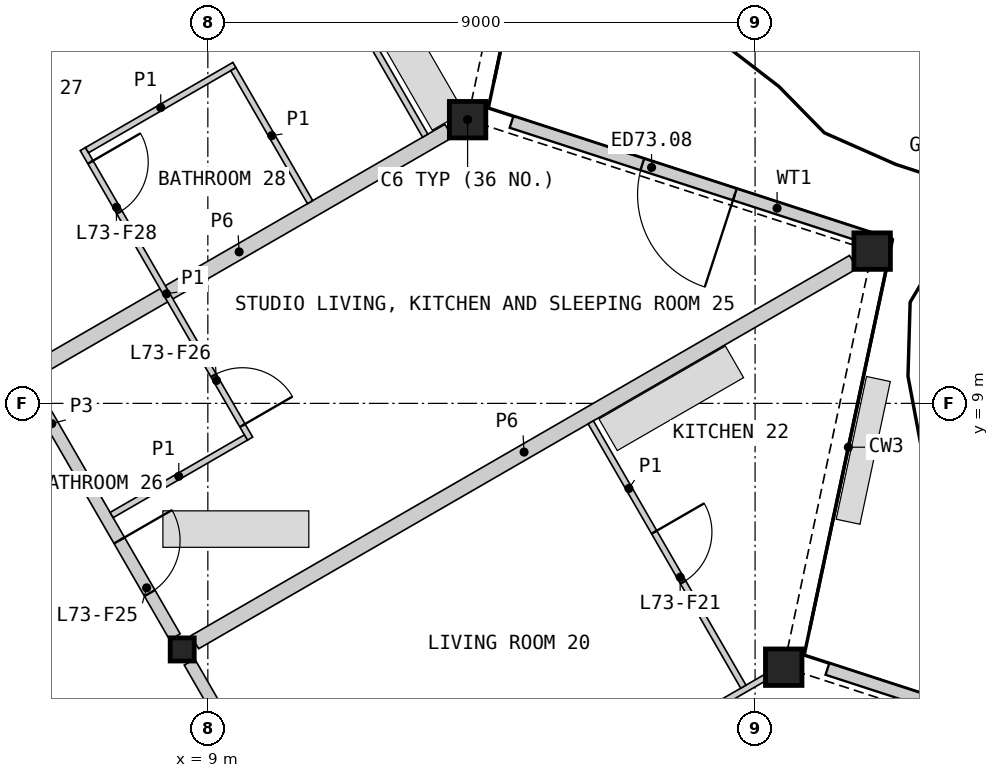
"""IFC4 building model, lengths in metres.
Left out: names, types, materials, properties, quantities, classifications, styles, units other than length and angle.
Written with IfcOpenShell. Run it as: python <this file> out.ifc"""

import sys

from ifc_helpers import new_model, si_unit, direction, frame, frame_2d, origin, origin_2d, place, context, subcontext, project, spatial, polyline, rectangle, hollow_rectangle, i_section, outline, extrude, element, fill, save


model = new_model("IFC4")
c1 = context("Model", 3, precision=1e-05, world=origin(), true_north=direction((0.0, 1.0)))
c2 = subcontext(c1, "Body", "Model", "MODEL_VIEW")
j1 = project(units=[si_unit("LENGTHUNIT", "METRE"), si_unit("PLANEANGLEUNIT", "RADIAN")], contexts=[c1])
p1 = place(None, origin())
s1 = spatial("IfcSite", under=j1, at=p1, CompositionType="ELEMENT")
p2 = place(p1, origin())
s2 = spatial("IfcBuilding", under=s1, at=p2, CompositionType="ELEMENT")
p3 = place(p2, frame((0.0, 0.0, 329.0)))
s3 = spatial("IfcBuildingStorey", under=s2, at=p3, CompositionType="ELEMENT", Elevation=329.0)
for number, where, z_axis, x_axis in (
    (1, (18.471, 4.661, 0.0), (0.0, 0.0, 1.0), (1.0, 0.0, 0.0)),
    (2, (19.926, 11.504, 0.0), (0.0, 0.0, 1.0), (1.0, 0.0, 0.0)),
    (3, (13.272, 13.666, 0.0), (0.0, 0.0, 1.0), (1.0, 0.0, 0.0)),
):
    element("IfcColumn", number, at=place(p3, frame(where, z_axis=z_axis, x_axis=x_axis)), inside=s3, PredefinedType="COLUMN", context=c2, shape_type="SweptSolid", body=[
        extrude(hollow_rectangle(XDim=0.6, YDim=0.6, WallThickness=0.04, at=origin_2d()), origin(), (0.0, 0.0, 1.0), 3.4),
    ])
p4 = place(p3, frame((8.578, 4.953, 0.0), z_axis=(0.0, 0.0, 1.0), x_axis=(1.0, 0.0, 0.0)))
e4 = element("IfcColumn", 4, at=p4, inside=s3, PredefinedType="COLUMN", context=c2, shape_type="SweptSolid", body=[
    extrude(i_section(OverallWidth=0.396, OverallDepth=0.381, WebThickness=0.019, FlangeThickness=0.03, at=origin_2d()), origin(), (0.0, 0.0, 1.0), 3.4),
])
p5 = place(p3, frame((25.012, 2.739, 0.0), z_axis=(0.0, 0.0, 1.0), x_axis=(-0.951056631566, 0.309016639608, 0.0)))
e5 = element("IfcWall", 5, at=p5, inside=s3, PredefinedType="SOLIDWALL", context=c2, shape_type="SweptSolid", body=[
    extrude(rectangle(XDim=6.122, YDim=0.2, at=frame_2d((3.061, 0.0))), origin(), (0.0, 0.0, 1.0), 2.488),
])
p6 = place(p5, frame((2.261, 0.0, 0.0)))
e6 = element("IfcOpeningElement", 6, at=p6, cuts=e5, PredefinedType="OPENING", context=c2, shape_type="SweptSolid", body=[
    extrude(rectangle(XDim=1.6, YDim=2.25, at=frame_2d((0.8, 1.125))), frame((0.0, 0.11, 0.0), z_axis=(0.0, -1.0, 0.0), x_axis=(1.0, 0.0, 0.0)), (0.0, 0.0, 1.0), 0.22),
])
p7 = place(p3, frame((19.817, 11.737, 0.0), z_axis=(0.0, 0.0, 1.0), x_axis=(-0.951056631566, 0.309016639608, 0.0)))
e7 = element("IfcWall", 7, at=p7, inside=s3, PredefinedType="SOLIDWALL", context=c2, shape_type="SweptSolid", body=[
    extrude(rectangle(XDim=6.122, YDim=0.2, at=frame_2d((3.061, 0.0))), origin(), (0.0, 0.0, 1.0), 2.488),
])
p8 = place(p7, frame((2.261, 0.0, 0.0)))
e8 = element("IfcOpeningElement", 8, at=p8, cuts=e7, PredefinedType="OPENING", context=c2, shape_type="SweptSolid", body=[
    extrude(rectangle(XDim=1.6, YDim=2.25, at=frame_2d((0.8, 1.125))), frame((0.0, 0.11, 0.0), z_axis=(0.0, -1.0, 0.0), x_axis=(1.0, 0.0, 0.0)), (0.0, 0.0, 1.0), 0.22),
])
p9 = place(p3, origin())
e9 = element("IfcWall", 9, at=p9, inside=s3, PredefinedType="SHEAR", context=c2, shape_type="SweptSolid", body=[
    extrude(outline(polyline([(1.561, 6.097), (3.731, 7.35), (8.231, -0.444), (6.061, -1.697), (5.96, -1.524), (7.952, -0.374), (6.952, 1.358), (4.96, 0.208), (4.861, 0.381), (6.852, 1.531), (5.852, 3.263), (3.861, 2.113), (3.76, 2.287), (5.752, 3.437), (4.752, 5.169), (2.76, 4.019), (2.66, 4.192), (4.652, 5.342), (3.652, 7.074), (1.66, 5.924), (1.561, 6.097)])), origin(), (0.0, 0.0, 1.0), 3.1),
])
p10 = place(p3, frame((8.686, -0.634, 0.0), z_axis=(0.0, 0.0, 1.0), x_axis=(-0.500004601921, 0.866022746848, 0.0)))
e10 = element("IfcWall", 10, at=p10, inside=s3, PredefinedType="SHEAR", context=c2, shape_type="SweptSolid", body=[
    extrude(rectangle(XDim=16.853, YDim=0.6, at=frame_2d((8.426, 0.0))), origin(), (0.0, 0.0, 1.0), 3.1),
])
p11 = place(p3, frame((8.786, 5.073, 0.0), z_axis=(0.0, 0.0, 1.0), x_axis=(0.86602139559, 0.500006942333, 0.0)))
e11 = element("IfcWall", 11, at=p11, inside=s3, PredefinedType="PARTITIONING", context=c2, shape_type="SweptSolid", body=[
    extrude(rectangle(XDim=12.505, YDim=0.25, at=frame_2d((6.252, 0.0))), origin(), (0.0, 0.0, 1.0), 2.33),
])
p12 = place(p3, frame((4.409, 12.174, 0.0), z_axis=(0.0, 0.0, 1.0), x_axis=(0.499984266882, -0.866034487114, 0.0)))
e12 = element("IfcWall", 12, at=p12, inside=s3, PredefinedType="PARTITIONING", context=c2, shape_type="SweptSolid", body=[
    extrude(rectangle(XDim=8.099, YDim=0.2, at=frame_2d((4.049, 0.0))), origin(), (0.0, 0.0, 1.0), 3.1),
])
p13 = place(p12, frame((6.269, 0.0, 0.0)))
e13 = element("IfcOpeningElement", 13, at=p13, cuts=e12, PredefinedType="OPENING", context=c2, shape_type="SweptSolid", body=[
    extrude(rectangle(XDim=1.0, YDim=2.1, at=frame_2d((0.5, 1.05))), frame((0.0, 0.11, 0.0), z_axis=(0.0, -1.0, 0.0), x_axis=(1.0, 0.0, 0.0)), (0.0, 0.0, 1.0), 0.22),
])
p14 = place(p12, frame((1.164, 0.0, 0.0)))
e14 = element("IfcOpeningElement", 14, at=p14, cuts=e12, PredefinedType="OPENING", context=c2, shape_type="SweptSolid", body=[
    extrude(rectangle(XDim=1.0, YDim=2.1, at=frame_2d((0.5, 1.05))), frame((0.0, 0.11, 0.0), z_axis=(0.0, -1.0, 0.0), x_axis=(1.0, 0.0, 0.0)), (0.0, 0.0, 1.0), 0.22),
])
p15 = place(p3, frame((8.698, 4.745, 0.0), z_axis=(0.0, 0.0, 1.0), x_axis=(0.499984266882, -0.866034487114, 0.0)))
e15 = element("IfcWall", 15, at=p15, inside=s3, PredefinedType="PARTITIONING", context=c2, shape_type="SweptSolid", body=[
    extrude(rectangle(XDim=8.099, YDim=0.2, at=frame_2d((4.049, 0.0))), origin(), (0.0, 0.0, 1.0), 3.1),
])
p16 = place(p15, frame((1.976, 0.0, 0.0)))
e16 = element("IfcOpeningElement", 16, at=p16, cuts=e15, PredefinedType="OPENING", context=c2, shape_type="SweptSolid", body=[
    extrude(rectangle(XDim=1.0, YDim=2.1, at=frame_2d((0.5, 1.05))), frame((0.0, 0.11, 0.0), z_axis=(0.0, -1.0, 0.0), x_axis=(1.0, 0.0, 0.0)), (0.0, 0.0, 1.0), 0.22),
])
p17 = place(p3, frame((6.068, 9.501, 0.0), z_axis=(0.0, 0.0, 1.0), x_axis=(0.866022671543, 0.50000473235, 0.0)))
e17 = element("IfcWall", 17, at=p17, inside=s3, PredefinedType="PARTITIONING", context=c2, shape_type="SweptSolid", body=[
    extrude(rectangle(XDim=7.961, YDim=0.25, at=frame_2d((3.98, 0.0))), origin(), (0.0, 0.0, 1.0), 2.33),
])
p18 = place(p3, frame((3.47, 14.0, 0.0), z_axis=(0.0, 0.0, 1.0), x_axis=(0.866021216079, 0.500007253249, 0.0)))
e18 = element("IfcWall", 18, at=p18, inside=s3, PredefinedType="PARTITIONING", context=c2, shape_type="SweptSolid", body=[
    extrude(rectangle(XDim=12.639, YDim=0.1, at=frame_2d((6.32, 0.0))), origin(), (0.0, 0.0, 1.0), 2.33),
])
p19 = place(p18, frame((8.314, 0.0, 0.0)))
e19 = element("IfcOpeningElement", 19, at=p19, cuts=e18, PredefinedType="OPENING", context=c2, shape_type="SweptSolid", body=[
    extrude(rectangle(XDim=0.95, YDim=2.1, at=frame_2d((0.475, 1.05))), frame((0.0, 0.06, 0.0), z_axis=(0.0, -1.0, 0.0), x_axis=(1.0, 0.0, 0.0)), (0.0, 0.0, 1.0), 0.12),
])
p20 = place(p3, frame((11.262, 0.504, 0.0), z_axis=(0.0, 0.0, 1.0), x_axis=(0.866020217342, 0.500008983073, 0.0)))
e20 = element("IfcWall", 20, at=p20, inside=s3, PredefinedType="PARTITIONING", context=c2, shape_type="SweptSolid", body=[
    extrude(rectangle(XDim=7.966, YDim=0.1, at=frame_2d((3.983, 0.0))), origin(), (0.0, 0.0, 1.0), 2.33),
])
p21 = place(p20, frame((5.362, 0.0, 0.0)))
e21 = element("IfcOpeningElement", 21, at=p21, cuts=e20, PredefinedType="OPENING", context=c2, shape_type="SweptSolid", body=[
    extrude(rectangle(XDim=0.95, YDim=2.1, at=frame_2d((0.475, 1.05))), frame((0.0, 0.06, 0.0), z_axis=(0.0, -1.0, 0.0), x_axis=(1.0, 0.0, 0.0)), (0.0, 0.0, 1.0), 0.12),
])
p22 = place(p3, frame((6.944, 13.183, 0.0), z_axis=(0.0, 0.0, 1.0), x_axis=(0.499996545922, -0.866027397988, 0.0)))
e22 = element("IfcWall", 22, at=p22, inside=s3, PredefinedType="PARTITIONING", context=c2, shape_type="SweptSolid", body=[
    extrude(rectangle(XDim=5.5, YDim=0.1, at=frame_2d((2.75, 0.0))), origin(), (0.0, 0.0, 1.0), 2.33),
])
p23 = place(p22, frame((4.3, 0.0, 0.0)))
e23 = element("IfcOpeningElement", 23, at=p23, cuts=e22, PredefinedType="OPENING", context=c2, shape_type="SweptSolid", body=[
    extrude(rectangle(XDim=0.95, YDim=2.1, at=frame_2d((0.475, 1.05))), frame((0.0, 0.06, 0.0), z_axis=(0.0, -1.0, 0.0), x_axis=(1.0, 0.0, 0.0)), (0.0, 0.0, 1.0), 0.12),
])
p24 = place(p22, frame((0.25, 0.0, 0.0)))
e24 = element("IfcOpeningElement", 24, at=p24, cuts=e22, PredefinedType="OPENING", context=c2, shape_type="SweptSolid", body=[
    extrude(rectangle(XDim=0.95, YDim=2.1, at=frame_2d((0.475, 1.05))), frame((0.0, 0.06, 0.0), z_axis=(0.0, -1.0, 0.0), x_axis=(1.0, 0.0, 0.0)), (0.0, 0.0, 1.0), 0.12),
])
p25 = place(p3, frame((10.065, 17.75, 0.0), z_axis=(0.0, 0.0, 1.0), x_axis=(0.499989096993, -0.866031698547, 0.0)))
e25 = element("IfcWall", 25, at=p25, inside=s3, PredefinedType="PARTITIONING", context=c2, shape_type="SweptSolid", body=[
    extrude(rectangle(XDim=5.02, YDim=0.1, at=frame_2d((2.51, 0.0))), origin(), (0.0, 0.0, 1.0), 2.33),
])
p26 = place(p25, frame((0.862, 0.0, 0.0)))
e26 = element("IfcOpeningElement", 26, at=p26, cuts=e25, PredefinedType="OPENING", context=c2, shape_type="SweptSolid", body=[
    extrude(rectangle(XDim=0.95, YDim=2.1, at=frame_2d((0.475, 1.05))), frame((0.0, 0.06, 0.0), z_axis=(0.0, -1.0, 0.0), x_axis=(1.0, 0.0, 0.0)), (0.0, 0.0, 1.0), 0.12),
])
p27 = place(p3, frame((15.297, 8.688, 0.0), z_axis=(0.0, 0.0, 1.0), x_axis=(0.499989096993, -0.866031698547, 0.0)))
e27 = element("IfcWall", 27, at=p27, inside=s3, PredefinedType="PARTITIONING", context=c2, shape_type="SweptSolid", body=[
    extrude(rectangle(XDim=5.02, YDim=0.1, at=frame_2d((2.51, 0.0))), origin(), (0.0, 0.0, 1.0), 2.33),
])
p28 = place(p27, frame((2.086, 0.0, 0.0)))
e28 = element("IfcOpeningElement", 28, at=p28, cuts=e27, PredefinedType="OPENING", context=c2, shape_type="SweptSolid", body=[
    extrude(rectangle(XDim=0.95, YDim=2.1, at=frame_2d((0.475, 1.05))), frame((0.0, 0.06, 0.0), z_axis=(0.0, -1.0, 0.0), x_axis=(1.0, 0.0, 0.0)), (0.0, 0.0, 1.0), 0.12),
])
p29 = place(p3, frame((7.013, 13.165, 0.0), z_axis=(0.0, 0.0, 1.0), x_axis=(0.866034573852, 0.49998411664, 0.0)))
e29 = element("IfcWall", 29, at=p29, inside=s3, PredefinedType="PARTITIONING", context=c2, shape_type="SweptSolid", body=[
    extrude(rectangle(XDim=2.8, YDim=0.1, at=frame_2d((1.4, 0.0))), origin(), (0.0, 0.0, 1.0), 2.33),
])
p30 = place(p3, frame((7.418, 7.163, 0.0), z_axis=(0.0, 0.0, 1.0), x_axis=(0.866054858364, 0.499948979701, 0.0)))
e30 = element("IfcWall", 30, at=p30, inside=s3, PredefinedType="PARTITIONING", context=c2, shape_type="SweptSolid", body=[
    extrude(rectangle(XDim=2.55, YDim=0.1, at=frame_2d((1.275, 0.0))), origin(), (0.0, 0.0, 1.0), 2.33),
])
p31 = place(p3, frame((9.419, 14.497, 0.0), z_axis=(0.0, 0.0, 1.0), x_axis=(0.499976333282, -0.866039067339, 0.0)))
e31 = element("IfcWall", 31, at=p31, inside=s3, PredefinedType="PARTITIONING", context=c2, shape_type="SweptSolid", body=[
    extrude(rectangle(XDim=2.525, YDim=0.1, at=frame_2d((1.262, 0.0))), origin(), (0.0, 0.0, 1.0), 2.33),
])
p32 = place(p8, origin())
e32 = element("IfcDoor", 32, at=p32, inside=s3, OperationType="DOUBLE_DOOR_SINGLE_SWING", PredefinedType="DOOR", context=c2, shape_type="SweptSolid", body=[
    extrude(rectangle(XDim=1.6, YDim=2.25, at=frame_2d((0.8, 1.125))), frame((0.0, 0.025, 0.0), z_axis=(0.0, -1.0, 0.0), x_axis=(1.0, 0.0, 0.0)), (0.0, 0.0, 1.0), 0.05),
])
fill(e8, e32)
p33 = place(p28, origin())
e33 = element("IfcDoor", 33, at=p33, inside=s3, OperationType="SINGLE_SWING_LEFT", PredefinedType="DOOR", context=c2, shape_type="SweptSolid", body=[
    extrude(rectangle(XDim=0.95, YDim=2.1, at=frame_2d((0.475, 1.05))), frame((0.0, 0.025, 0.0), z_axis=(0.0, -1.0, 0.0), x_axis=(1.0, 0.0, 0.0)), (0.0, 0.0, 1.0), 0.05),
])
fill(e28, e33)
p34 = place(p13, origin())
e34 = element("IfcDoor", 34, at=p34, inside=s3, OperationType="SINGLE_SWING_LEFT", PredefinedType="DOOR", context=c2, shape_type="SweptSolid", body=[
    extrude(rectangle(XDim=1.0, YDim=2.1, at=frame_2d((0.5, 1.05))), frame((0.0, 0.025, 0.0), z_axis=(0.0, -1.0, 0.0), x_axis=(1.0, 0.0, 0.0)), (0.0, 0.0, 1.0), 0.05),
])
fill(e13, e34)
p35 = place(p23, origin())
e35 = element("IfcDoor", 35, at=p35, inside=s3, OperationType="SINGLE_SWING_RIGHT", PredefinedType="DOOR", context=c2, shape_type="SweptSolid", body=[
    extrude(rectangle(XDim=0.95, YDim=2.1, at=frame_2d((0.475, 1.05))), frame((0.0, 0.025, 0.0), z_axis=(0.0, -1.0, 0.0), x_axis=(1.0, 0.0, 0.0)), (0.0, 0.0, 1.0), 0.05),
])
fill(e23, e35)
p36 = place(p24, origin())
e36 = element("IfcDoor", 36, at=p36, inside=s3, OperationType="SINGLE_SWING_LEFT", PredefinedType="DOOR", context=c2, shape_type="SweptSolid", body=[
    extrude(rectangle(XDim=0.95, YDim=2.1, at=frame_2d((0.475, 1.05))), frame((0.0, 0.025, 0.0), z_axis=(0.0, -1.0, 0.0), x_axis=(1.0, 0.0, 0.0)), (0.0, 0.0, 1.0), 0.05),
])
fill(e24, e36)
save(model, sys.argv[1])
